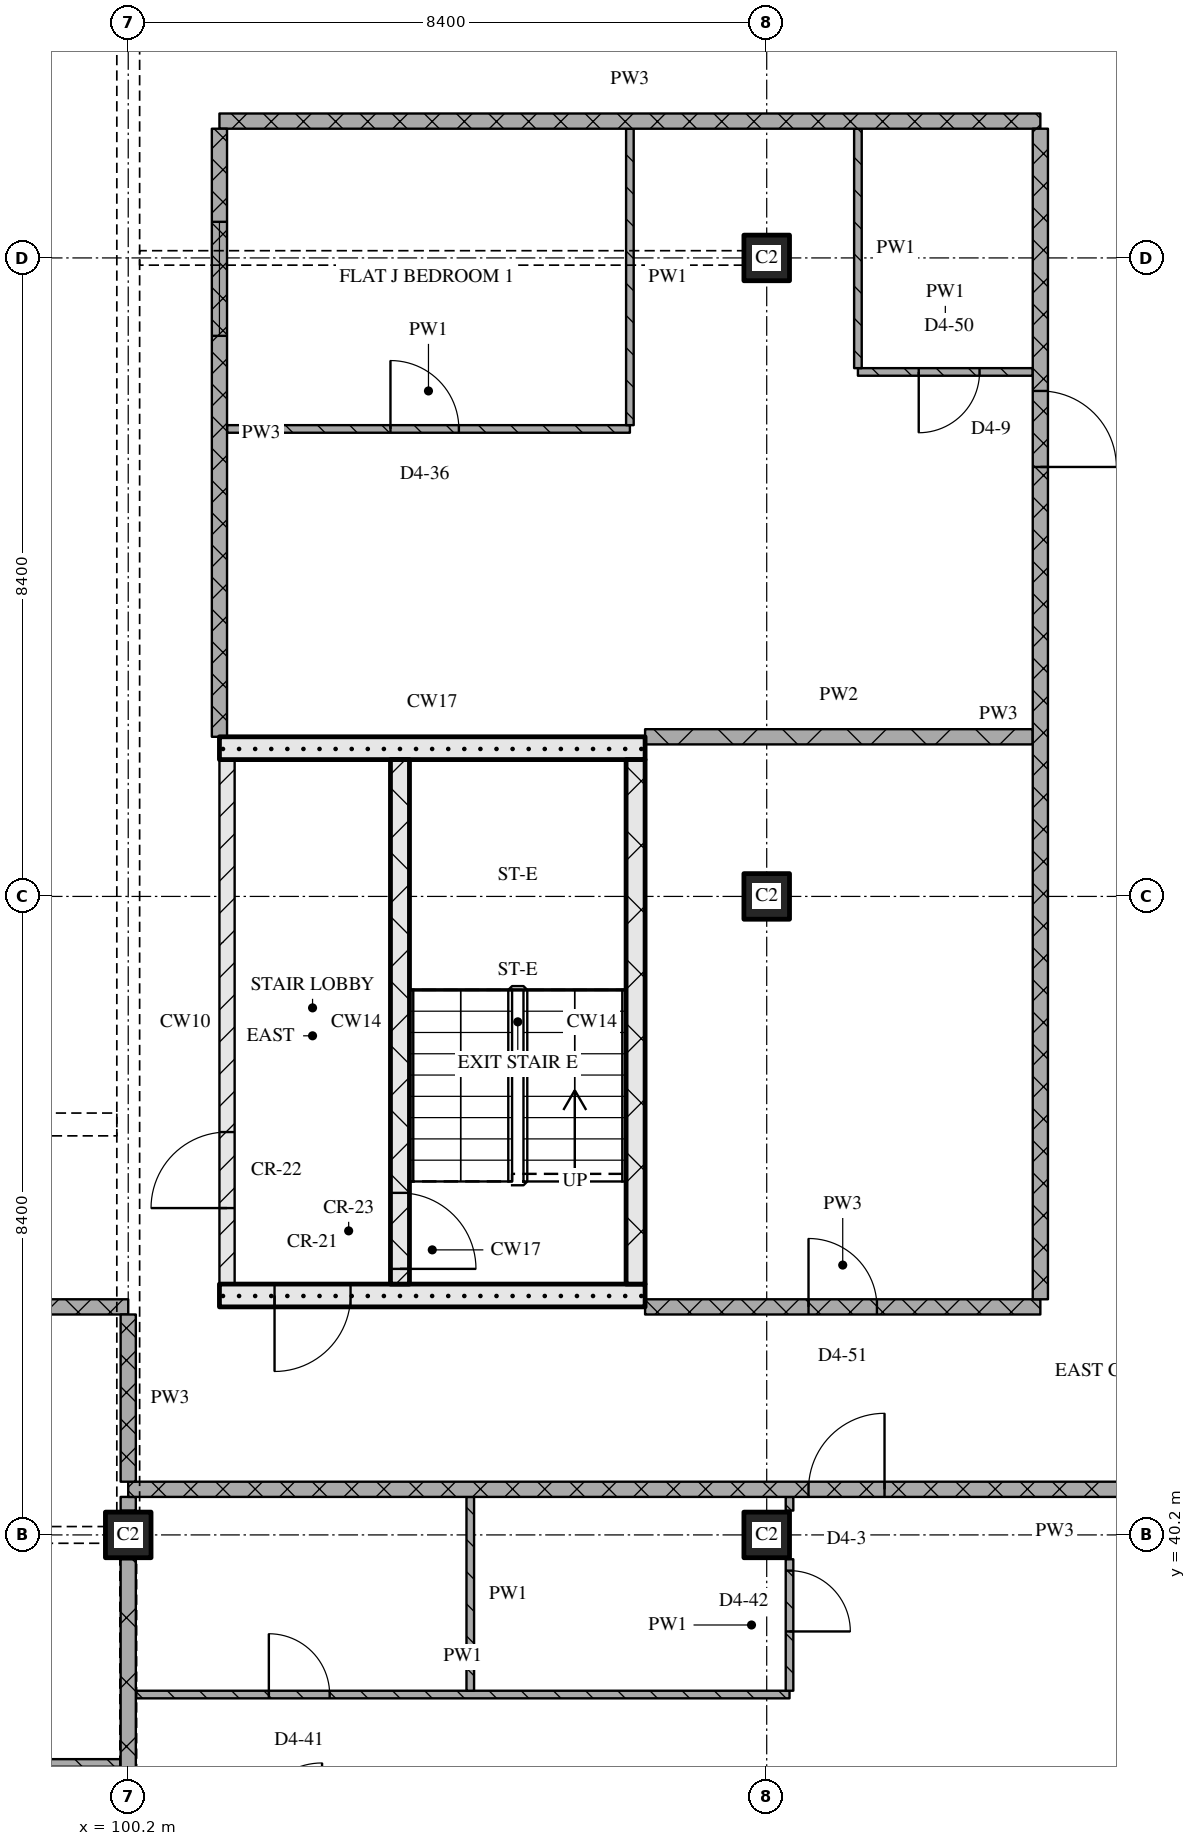
"""IFC4 building model, lengths in metres.
Left out: names, types, materials, properties, quantities, classifications, styles, units other than length and angle.
Written with IfcOpenShell. Run it as: python <this file> out.ifc"""

import sys

from ifc_helpers import new_model, si_unit, direction, frame, frame_2d, origin, origin_2d, place, context, subcontext, project, spatial, rectangle, extrude, element, fill, save


model = new_model("IFC4")
c1 = context("Model", 3, precision=1e-05, world=origin(), true_north=direction((0.0, 1.0)))
c2 = subcontext(c1, "Body", "Model", "MODEL_VIEW")
j1 = project(units=[si_unit("LENGTHUNIT", "METRE"), si_unit("PLANEANGLEUNIT", "RADIAN")], contexts=[c1])
p1 = place(None, origin())
s1 = spatial("IfcSite", under=j1, at=p1, CompositionType="ELEMENT")
p2 = place(p1, origin())
s2 = spatial("IfcBuilding", under=s1, at=p2, CompositionType="ELEMENT")
p3 = place(p2, frame((0.0, 0.0, 241.5)))
s3 = spatial("IfcBuildingStorey", under=s2, at=p3, CompositionType="ELEMENT", Elevation=241.5)
for number, where, z_axis, x_axis in (
    (1, (100.2, 40.2, 0.0), (0.0, 0.0, 1.0), (1.0, 0.0, 0.0)),
    (2, (108.6, 40.2, 0.0), (0.0, 0.0, 1.0), (1.0, 0.0, 0.0)),
    (3, (108.6, 48.6, 0.0), (0.0, 0.0, 1.0), (1.0, 0.0, 0.0)),
    (4, (108.6, 57.0, 0.0), (0.0, 0.0, 1.0), (1.0, 0.0, 0.0)),
):
    element("IfcColumn", number, at=place(p3, frame(where, z_axis=z_axis, x_axis=x_axis)), inside=s3, PredefinedType="COLUMN", context=c2, shape_type="SweptSolid", body=[
        extrude(rectangle(XDim=0.6, YDim=0.6, at=origin_2d()), origin(), (0.0, 0.0, 1.0), 3.6),
    ])
p4 = place(p3, frame((101.4, 43.35, 0.0), z_axis=(0.0, 0.0, 1.0), x_axis=(1.0, 0.0, 0.0)))
e5 = element("IfcWall", 5, at=p4, inside=s3, PredefinedType="SOLIDWALL", context=c2, shape_type="SweptSolid", body=[
    extrude(rectangle(XDim=5.6, YDim=0.3, at=frame_2d((2.8, 0.0))), origin(), (0.0, 0.0, 1.0), 3.32),
])
p5 = place(p4, frame((0.725, 0.0, 0.0)))
e6 = element("IfcOpeningElement", 6, at=p5, cuts=e5, PredefinedType="OPENING", context=c2, shape_type="SweptSolid", body=[
    extrude(rectangle(XDim=1.0, YDim=2.1, at=frame_2d((0.5, 1.05))), frame((0.0, 0.16, 0.0), z_axis=(0.0, -1.0, 0.0), x_axis=(1.0, 0.0, 0.0)), (0.0, 0.0, 1.0), 0.32),
])
p6 = place(p3, frame((101.5, 43.5, 0.0), z_axis=(0.0, 0.0, 1.0), x_axis=(0.0, 1.0, 0.0)))
e7 = element("IfcWall", 7, at=p6, inside=s3, PredefinedType="PARTITIONING", context=c2, shape_type="SweptSolid", body=[
    extrude(rectangle(XDim=6.9, YDim=0.2, at=frame_2d((3.45, 0.0))), origin(), (0.0, 0.0, 1.0), 3.32),
])
p7 = place(p6, frame((1.0, 0.0, 0.0)))
e8 = element("IfcOpeningElement", 8, at=p7, cuts=e7, PredefinedType="OPENING", context=c2, shape_type="SweptSolid", body=[
    extrude(rectangle(XDim=1.0, YDim=2.1, at=frame_2d((0.5, 1.05))), frame((0.0, 0.11, 0.0), z_axis=(0.0, -1.0, 0.0), x_axis=(1.0, 0.0, 0.0)), (0.0, 0.0, 1.0), 0.22),
])
p8 = place(p3, frame((103.775, 43.5, 0.0), z_axis=(0.0, 0.0, 1.0), x_axis=(0.0, 1.0, 0.0)))
e9 = element("IfcWall", 9, at=p8, inside=s3, PredefinedType="SOLIDWALL", context=c2, shape_type="SweptSolid", body=[
    extrude(rectangle(XDim=6.9, YDim=0.25, at=frame_2d((3.45, 0.0))), origin(), (0.0, 0.0, 1.0), 3.32),
])
p9 = place(p8, frame((0.2, 0.0, 0.0)))
e10 = element("IfcOpeningElement", 10, at=p9, cuts=e9, PredefinedType="OPENING", context=c2, shape_type="SweptSolid", body=[
    extrude(rectangle(XDim=1.0, YDim=2.1, at=frame_2d((0.5, 1.05))), frame((0.0, 0.135, 0.0), z_axis=(0.0, -1.0, 0.0), x_axis=(1.0, 0.0, 0.0)), (0.0, 0.0, 1.0), 0.27),
])
p10 = place(p3, frame((106.875, 43.5, 0.0), z_axis=(0.0, 0.0, 1.0), x_axis=(0.0, 1.0, 0.0)))
e11 = element("IfcWall", 11, at=p10, inside=s3, PredefinedType="SOLIDWALL", context=c2, shape_type="SweptSolid", body=[
    extrude(rectangle(XDim=6.9, YDim=0.25, at=frame_2d((3.45, 0.0))), origin(), (0.0, 0.0, 1.0), 3.32),
])
p11 = place(p3, frame((101.4, 50.55, 0.0), z_axis=(0.0, 0.0, 1.0), x_axis=(1.0, 0.0, 0.0)))
e12 = element("IfcWall", 12, at=p11, inside=s3, PredefinedType="SOLIDWALL", context=c2, shape_type="SweptSolid", body=[
    extrude(rectangle(XDim=5.6, YDim=0.3, at=frame_2d((2.8, 0.0))), origin(), (0.0, 0.0, 1.0), 3.32),
])
p12 = place(p3, frame((91.2, 37.2, 0.0), z_axis=(0.0, 0.0, 1.0), x_axis=(1.0, 0.0, 0.0)))
e13 = element("IfcWall", 13, at=p12, inside=s3, PredefinedType="PARTITIONING", context=c2, shape_type="SweptSolid", body=[
    extrude(rectangle(XDim=8.9, YDim=0.1, at=frame_2d((4.45, 0.0))), origin(), (0.0, 0.0, 1.0), 3.32),
])
p13 = place(p12, frame((6.308, 0.0, 0.0)))
e14 = element("IfcOpeningElement", 14, at=p13, cuts=e13, PredefinedType="OPENING", context=c2, shape_type="SweptSolid", body=[
    extrude(rectangle(XDim=0.8, YDim=2.1, at=frame_2d((0.4, 1.05))), frame((0.0, 0.06, 0.0), z_axis=(0.0, -1.0, 0.0), x_axis=(1.0, 0.0, 0.0)), (0.0, 0.0, 1.0), 0.12),
])
p14 = place(p3, frame((100.3, 38.1, 0.0), z_axis=(0.0, 0.0, 1.0), x_axis=(1.0, 0.0, 0.0)))
e15 = element("IfcWall", 15, at=p14, inside=s3, PredefinedType="PARTITIONING", context=c2, shape_type="SweptSolid", body=[
    extrude(rectangle(XDim=8.6, YDim=0.1, at=frame_2d((4.3, 0.0))), origin(), (0.0, 0.0, 1.0), 3.32),
])
p15 = place(p14, frame((1.75, 0.0, 0.0)))
e16 = element("IfcOpeningElement", 16, at=p15, cuts=e15, PredefinedType="OPENING", context=c2, shape_type="SweptSolid", body=[
    extrude(rectangle(XDim=0.8, YDim=2.1, at=frame_2d((0.4, 1.05))), frame((0.0, 0.06, 0.0), z_axis=(0.0, -1.0, 0.0), x_axis=(1.0, 0.0, 0.0)), (0.0, 0.0, 1.0), 0.12),
])
p16 = place(p3, frame((124.58, 40.8, 0.0), z_axis=(0.0, 0.0, 1.0), x_axis=(-1.0, 0.0, 0.0)))
e17 = element("IfcWall", 17, at=p16, inside=s3, PredefinedType="PARTITIONING", context=c2, shape_type="SweptSolid", body=[
    extrude(rectangle(XDim=24.38, YDim=0.2, at=frame_2d((12.19, 0.0))), origin(), (0.0, 0.0, 1.0), 3.32),
])
p17 = place(p16, frame((14.43, 0.0, 0.0)))
e18 = element("IfcOpeningElement", 18, at=p17, cuts=e17, PredefinedType="OPENING", context=c2, shape_type="SweptSolid", body=[
    extrude(rectangle(XDim=1.0, YDim=2.1, at=frame_2d((0.5, 1.05))), frame((0.0, 0.11, 0.0), z_axis=(0.0, -1.0, 0.0), x_axis=(1.0, 0.0, 0.0)), (0.0, 0.0, 1.0), 0.22),
])
p18 = place(p3, frame((100.2, 43.2, 0.0), z_axis=(0.0, 0.0, 1.0), x_axis=(-1.0, 0.0, 0.0)))
e19 = element("IfcWall", 19, at=p18, inside=s3, PredefinedType="PARTITIONING", context=c2, shape_type="SweptSolid", body=[
    extrude(rectangle(XDim=25.2, YDim=0.2, at=frame_2d((12.6, 0.0))), origin(), (0.0, 0.0, 1.0), 3.32),
])
p19 = place(p18, frame((9.25, 0.0, 0.0)))
e20 = element("IfcOpeningElement", 20, at=p19, cuts=e19, PredefinedType="OPENING", context=c2, shape_type="SweptSolid", body=[
    extrude(rectangle(XDim=1.0, YDim=2.1, at=frame_2d((0.5, 1.05))), frame((0.0, 0.11, 0.0), z_axis=(0.0, -1.0, 0.0), x_axis=(1.0, 0.0, 0.0)), (0.0, 0.0, 1.0), 0.22),
])
p20 = place(p3, frame((107.0, 43.2, 0.0), z_axis=(0.0, 0.0, 1.0), x_axis=(1.0, 0.0, 0.0)))
e21 = element("IfcWall", 21, at=p20, inside=s3, PredefinedType="PARTITIONING", context=c2, shape_type="SweptSolid", body=[
    extrude(rectangle(XDim=5.2, YDim=0.2, at=frame_2d((2.6, 0.0))), origin(), (0.0, 0.0, 1.0), 3.32),
])
p21 = place(p20, frame((2.15, 0.0, 0.0)))
e22 = element("IfcOpeningElement", 22, at=p21, cuts=e21, PredefinedType="OPENING", context=c2, shape_type="SweptSolid", body=[
    extrude(rectangle(XDim=0.9, YDim=2.1, at=frame_2d((0.45, 1.05))), frame((0.0, 0.11, 0.0), z_axis=(0.0, -1.0, 0.0), x_axis=(1.0, 0.0, 0.0)), (0.0, 0.0, 1.0), 0.22),
])
p22 = place(p3, frame((107.0, 50.7, 0.0), z_axis=(0.0, 0.0, 1.0), x_axis=(1.0, 0.0, 0.0)))
e23 = element("IfcWall", 23, at=p22, inside=s3, PredefinedType="PARTITIONING", context=c2, shape_type="SweptSolid", body=[
    extrude(rectangle(XDim=5.1, YDim=0.2, at=frame_2d((2.55, 0.0))), origin(), (0.0, 0.0, 1.0), 3.32),
])
p23 = place(p3, frame((101.5, 54.75, 0.0), z_axis=(0.0, 0.0, 1.0), x_axis=(1.0, 0.0, 0.0)))
e24 = element("IfcWall", 24, at=p23, inside=s3, PredefinedType="PARTITIONING", context=c2, shape_type="SweptSolid", body=[
    extrude(rectangle(XDim=5.3, YDim=0.1, at=frame_2d((2.65, 0.0))), origin(), (0.0, 0.0, 1.0), 3.32),
])
p24 = place(p23, frame((2.15, 0.0, 0.0)))
e25 = element("IfcOpeningElement", 25, at=p24, cuts=e24, PredefinedType="OPENING", context=c2, shape_type="SweptSolid", body=[
    extrude(rectangle(XDim=0.9, YDim=2.1, at=frame_2d((0.45, 1.05))), frame((0.0, 0.06, 0.0), z_axis=(0.0, -1.0, 0.0), x_axis=(1.0, 0.0, 0.0)), (0.0, 0.0, 1.0), 0.12),
])
p25 = place(p3, frame((109.8, 55.5, 0.0), z_axis=(0.0, 0.0, 1.0), x_axis=(1.0, 0.0, 0.0)))
e26 = element("IfcWall", 26, at=p25, inside=s3, PredefinedType="PARTITIONING", context=c2, shape_type="SweptSolid", body=[
    extrude(rectangle(XDim=2.3, YDim=0.1, at=frame_2d((1.15, 0.0))), origin(), (0.0, 0.0, 1.0), 3.32),
])
p26 = place(p25, frame((0.8, 0.0, 0.0)))
e27 = element("IfcOpeningElement", 27, at=p26, cuts=e26, PredefinedType="OPENING", context=c2, shape_type="SweptSolid", body=[
    extrude(rectangle(XDim=0.8, YDim=2.1, at=frame_2d((0.4, 1.05))), frame((0.0, 0.06, 0.0), z_axis=(0.0, -1.0, 0.0), x_axis=(1.0, 0.0, 0.0)), (0.0, 0.0, 1.0), 0.12),
])
p27 = place(p3, frame((101.4, 58.8, 0.0), z_axis=(0.0, 0.0, 1.0), x_axis=(1.0, 0.0, 0.0)))
e28 = element("IfcWall", 28, at=p27, inside=s3, PredefinedType="PARTITIONING", context=c2, shape_type="SweptSolid", body=[
    extrude(rectangle(XDim=10.8, YDim=0.2, at=frame_2d((5.4, 0.0))), origin(), (0.0, 0.0, 1.0), 3.32),
])
p28 = place(p3, frame((100.2, 43.1, 0.0), z_axis=(0.0, 0.0, 1.0), x_axis=(0.0, -1.0, 0.0)))
e29 = element("IfcWall", 29, at=p28, inside=s3, PredefinedType="PARTITIONING", context=c2, shape_type="SweptSolid", body=[
    extrude(rectangle(XDim=2.2, YDim=0.2, at=frame_2d((1.1, 0.0))), origin(), (0.0, 0.0, 1.0), 2.53),
])
p29 = place(p3, frame((100.2, 39.88, 0.0), z_axis=(0.0, 0.0, 1.0), x_axis=(0.0, -1.0, 0.0)))
e30 = element("IfcWall", 30, at=p29, inside=s3, PredefinedType="PARTITIONING", context=c2, shape_type="SweptSolid", body=[
    extrude(rectangle(XDim=7.76, YDim=0.2, at=frame_2d((3.88, 0.0))), origin(), (0.0, 0.0, 1.0), 2.72),
])
p30 = place(p3, frame((100.2, 40.7, 0.0), z_axis=(0.0, 0.0, 1.0), x_axis=(0.0, -1.0, 0.0)))
e31 = element("IfcWall", 31, at=p30, inside=s3, PredefinedType="PARTITIONING", context=c2, shape_type="SweptSolid", body=[
    extrude(rectangle(XDim=0.18, YDim=0.2, at=frame_2d((0.09, 0.0))), origin(), (0.0, 0.0, 1.0), 3.32),
])
p31 = place(p3, frame((101.4, 58.7, 0.0), z_axis=(0.0, 0.0, 1.0), x_axis=(0.0, -1.0, 0.0)))
e32 = element("IfcWall", 32, at=p31, inside=s3, PredefinedType="PARTITIONING", context=c2, shape_type="SweptSolid", body=[
    extrude(rectangle(XDim=8.0, YDim=0.2, at=frame_2d((4.0, 0.0))), origin(), (0.0, 0.0, 1.0), 3.32),
])
p32 = place(p31, frame((1.225, 0.0, 0.9)))
e33 = element("IfcOpeningElement", 33, at=p32, cuts=e32, PredefinedType="OPENING", context=c2, shape_type="SweptSolid", body=[
    extrude(rectangle(XDim=1.5, YDim=1.5, at=frame_2d((0.75, 0.75))), frame((0.0, 0.11, 0.0), z_axis=(0.0, -1.0, 0.0), x_axis=(1.0, 0.0, 0.0)), (0.0, 0.0, 1.0), 0.22),
])
p33 = place(p3, frame((104.7, 40.7, 0.0), z_axis=(0.0, 0.0, 1.0), x_axis=(0.0, -1.0, 0.0)))
e34 = element("IfcWall", 34, at=p33, inside=s3, PredefinedType="PARTITIONING", context=c2, shape_type="SweptSolid", body=[
    extrude(rectangle(XDim=2.55, YDim=0.1, at=frame_2d((1.275, 0.0))), origin(), (0.0, 0.0, 1.0), 3.32),
])
p34 = place(p3, frame((106.8, 58.7, 0.0), z_axis=(0.0, 0.0, 1.0), x_axis=(0.0, -1.0, 0.0)))
e35 = element("IfcWall", 35, at=p34, inside=s3, PredefinedType="PARTITIONING", context=c2, shape_type="SweptSolid", body=[
    extrude(rectangle(XDim=3.9, YDim=0.1, at=frame_2d((1.95, 0.0))), origin(), (0.0, 0.0, 1.0), 3.32),
])
p35 = place(p3, frame((108.9, 38.15, 0.0), z_axis=(0.0, 0.0, 1.0), x_axis=(0.0, 1.0, 0.0)))
e36 = element("IfcWall", 36, at=p35, inside=s3, PredefinedType="PARTITIONING", context=c2, shape_type="SweptSolid", body=[
    extrude(rectangle(XDim=1.73, YDim=0.1, at=frame_2d((0.865, 0.0))), origin(), (0.0, 0.0, 1.0), 3.32),
])
p36 = place(p35, frame((0.78, 0.0, 0.0)))
e37 = element("IfcOpeningElement", 37, at=p36, cuts=e36, PredefinedType="OPENING", context=c2, shape_type="SweptSolid", body=[
    extrude(rectangle(XDim=0.8, YDim=2.1, at=frame_2d((0.4, 1.05))), frame((0.0, 0.06, 0.0), z_axis=(0.0, -1.0, 0.0), x_axis=(1.0, 0.0, 0.0)), (0.0, 0.0, 1.0), 0.12),
])
p37 = place(p3, frame((108.9, 40.7, 0.0), z_axis=(0.0, 0.0, 1.0), x_axis=(0.0, -1.0, 0.0)))
e38 = element("IfcWall", 38, at=p37, inside=s3, PredefinedType="PARTITIONING", context=c2, shape_type="SweptSolid", body=[
    extrude(rectangle(XDim=0.18, YDim=0.1, at=frame_2d((0.09, 0.0))), origin(), (0.0, 0.0, 1.0), 3.32),
])
p38 = place(p3, frame((109.8, 58.7, 0.0), z_axis=(0.0, 0.0, 1.0), x_axis=(0.0, -1.0, 0.0)))
e39 = element("IfcWall", 39, at=p38, inside=s3, PredefinedType="PARTITIONING", context=c2, shape_type="SweptSolid", body=[
    extrude(rectangle(XDim=3.15, YDim=0.1, at=frame_2d((1.575, 0.0))), origin(), (0.0, 0.0, 1.0), 3.32),
])
p39 = place(p3, frame((112.2, 43.3, 0.0), z_axis=(0.0, 0.0, 1.0), x_axis=(0.0, 1.0, 0.0)))
e40 = element("IfcWall", 40, at=p39, inside=s3, PredefinedType="PARTITIONING", context=c2, shape_type="SweptSolid", body=[
    extrude(rectangle(XDim=15.4, YDim=0.2, at=frame_2d((7.7, 0.0))), origin(), (0.0, 0.0, 1.0), 3.32),
])
p40 = place(p39, frame((10.95, 0.0, 0.0)))
e41 = element("IfcOpeningElement", 41, at=p40, cuts=e40, PredefinedType="OPENING", context=c2, shape_type="SweptSolid", body=[
    extrude(rectangle(XDim=1.0, YDim=2.1, at=frame_2d((0.5, 1.05))), frame((0.0, 0.11, 0.0), z_axis=(0.0, -1.0, 0.0), x_axis=(1.0, 0.0, 0.0)), (0.0, 0.0, 1.0), 0.22),
])
p41 = place(p5, origin())
e42 = element("IfcDoor", 42, at=p41, inside=s3, OperationType="SINGLE_SWING_RIGHT", PredefinedType="DOOR", context=c2, shape_type="SweptSolid", body=[
    extrude(rectangle(XDim=1.0, YDim=2.1, at=frame_2d((0.5, 1.05))), frame((0.0, 0.025, 0.0), z_axis=(0.0, -1.0, 0.0), x_axis=(1.0, 0.0, 0.0)), (0.0, 0.0, 1.0), 0.05),
])
fill(e6, e42)
p42 = place(p9, origin())
e43 = element("IfcDoor", 43, at=p42, inside=s3, OperationType="SINGLE_SWING_RIGHT", PredefinedType="DOOR", context=c2, shape_type="SweptSolid", body=[
    extrude(rectangle(XDim=1.0, YDim=2.1, at=frame_2d((0.5, 1.05))), frame((0.0, 0.025, 0.0), z_axis=(0.0, -1.0, 0.0), x_axis=(1.0, 0.0, 0.0)), (0.0, 0.0, 1.0), 0.05),
])
fill(e10, e43)
p43 = place(p7, origin())
e44 = element("IfcDoor", 44, at=p43, inside=s3, OperationType="SINGLE_SWING_LEFT", PredefinedType="DOOR", context=c2, shape_type="SweptSolid", body=[
    extrude(rectangle(XDim=1.0, YDim=2.1, at=frame_2d((0.5, 1.05))), frame((0.0, 0.025, 0.0), z_axis=(0.0, -1.0, 0.0), x_axis=(1.0, 0.0, 0.0)), (0.0, 0.0, 1.0), 0.05),
])
fill(e8, e44)
p44 = place(p15, origin())
e45 = element("IfcDoor", 45, at=p44, inside=s3, OperationType="SINGLE_SWING_LEFT", PredefinedType="DOOR", context=c2, shape_type="SweptSolid", body=[
    extrude(rectangle(XDim=0.8, YDim=2.1, at=frame_2d((0.4, 1.05))), frame((0.0, 0.025, 0.0), z_axis=(0.0, -1.0, 0.0), x_axis=(1.0, 0.0, 0.0)), (0.0, 0.0, 1.0), 0.05),
])
fill(e16, e45)
p45 = place(p17, origin())
e46 = element("IfcDoor", 46, at=p45, inside=s3, OperationType="SINGLE_SWING_RIGHT", PredefinedType="DOOR", context=c2, shape_type="SweptSolid", body=[
    extrude(rectangle(XDim=1.0, YDim=2.1, at=frame_2d((0.5, 1.05))), frame((0.0, 0.025, 0.0), z_axis=(0.0, -1.0, 0.0), x_axis=(1.0, 0.0, 0.0)), (0.0, 0.0, 1.0), 0.05),
])
fill(e18, e46)
p46 = place(p21, origin())
e47 = element("IfcDoor", 47, at=p46, inside=s3, OperationType="SINGLE_SWING_LEFT", PredefinedType="DOOR", context=c2, shape_type="SweptSolid", body=[
    extrude(rectangle(XDim=0.9, YDim=2.1, at=frame_2d((0.45, 1.05))), frame((0.0, 0.025, 0.0), z_axis=(0.0, -1.0, 0.0), x_axis=(1.0, 0.0, 0.0)), (0.0, 0.0, 1.0), 0.05),
])
fill(e22, e47)
p47 = place(p24, origin())
e48 = element("IfcDoor", 48, at=p47, inside=s3, OperationType="SINGLE_SWING_LEFT", PredefinedType="DOOR", context=c2, shape_type="SweptSolid", body=[
    extrude(rectangle(XDim=0.9, YDim=2.1, at=frame_2d((0.45, 1.05))), frame((0.0, 0.025, 0.0), z_axis=(0.0, -1.0, 0.0), x_axis=(1.0, 0.0, 0.0)), (0.0, 0.0, 1.0), 0.05),
])
fill(e25, e48)
p48 = place(p26, origin())
e49 = element("IfcDoor", 49, at=p48, inside=s3, OperationType="SINGLE_SWING_RIGHT", PredefinedType="DOOR", context=c2, shape_type="SweptSolid", body=[
    extrude(rectangle(XDim=0.8, YDim=2.1, at=frame_2d((0.4, 1.05))), frame((0.0, 0.025, 0.0), z_axis=(0.0, -1.0, 0.0), x_axis=(1.0, 0.0, 0.0)), (0.0, 0.0, 1.0), 0.05),
])
fill(e27, e49)
p49 = place(p36, origin())
e50 = element("IfcDoor", 50, at=p49, inside=s3, OperationType="SINGLE_SWING_RIGHT", PredefinedType="DOOR", context=c2, shape_type="SweptSolid", body=[
    extrude(rectangle(XDim=0.8, YDim=2.1, at=frame_2d((0.4, 1.05))), frame((0.0, 0.025, 0.0), z_axis=(0.0, -1.0, 0.0), x_axis=(1.0, 0.0, 0.0)), (0.0, 0.0, 1.0), 0.05),
])
fill(e37, e50)
p50 = place(p40, origin())
e51 = element("IfcDoor", 51, at=p50, inside=s3, OperationType="SINGLE_SWING_RIGHT", PredefinedType="DOOR", context=c2, shape_type="SweptSolid", body=[
    extrude(rectangle(XDim=1.0, YDim=2.1, at=frame_2d((0.5, 1.05))), frame((0.0, 0.025, 0.0), z_axis=(0.0, -1.0, 0.0), x_axis=(1.0, 0.0, 0.0)), (0.0, 0.0, 1.0), 0.05),
])
fill(e41, e51)
p51 = place(p32, origin())
e52 = element("IfcWindow", 52, at=p51, inside=s3, PartitioningType="SINGLE_PANEL", PredefinedType="WINDOW", context=c2, shape_type="SweptSolid", body=[
    extrude(rectangle(XDim=1.5, YDim=1.5, at=frame_2d((0.75, 0.75))), frame((0.0, 0.03, 0.0), z_axis=(0.0, -1.0, 0.0), x_axis=(1.0, 0.0, 0.0)), (0.0, 0.0, 1.0), 0.06),
])
fill(e33, e52)
save(model, sys.argv[1])
